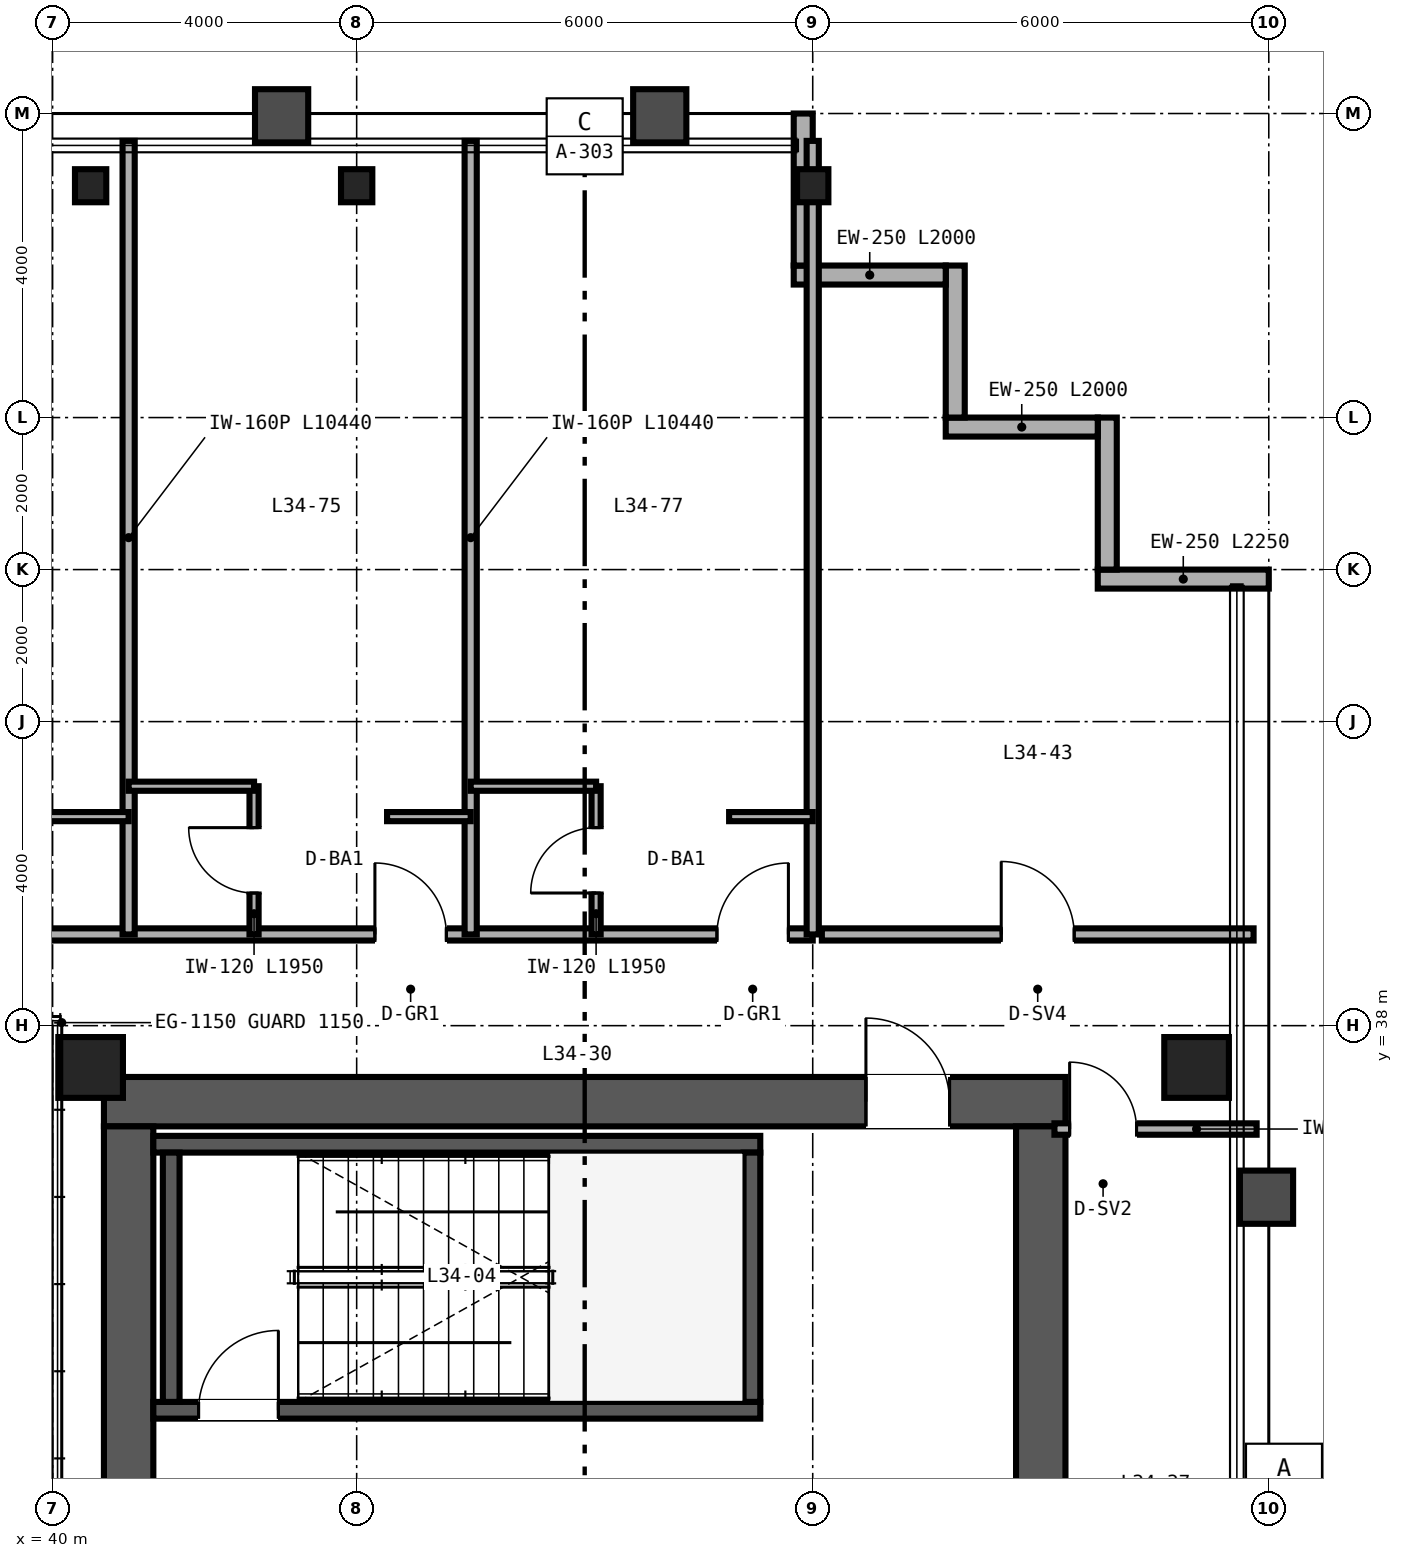
"""IFC4 building model, lengths in metres.
Left out: names, types, materials, properties, quantities, classifications, styles, units other than length and angle.
Written with IfcOpenShell. Run it as: python <this file> out.ifc"""

import sys

from ifc_helpers import new_model, si_unit, direction, frame, frame_2d, origin, origin_2d, place, context, subcontext, project, spatial, rectangle, hollow_rectangle, i_section, extrude, source, transform, mapped, element, fill, save


model = new_model("IFC4")
c1 = context("Model", 3, precision=1e-05, world=origin(), true_north=direction((0.0, 1.0)))
c2 = subcontext(c1, "Body", "Model", "MODEL_VIEW")
j1 = project(units=[si_unit("LENGTHUNIT", "METRE"), si_unit("PLANEANGLEUNIT", "RADIAN")], contexts=[c1])
p1 = place(None, origin())
s1 = spatial("IfcSite", under=j1, at=p1, CompositionType="ELEMENT")
p2 = place(p1, origin())
s2 = spatial("IfcBuilding", under=s1, at=p2, CompositionType="ELEMENT")
p3 = place(p2, frame((0.0, 0.0, 136.8)))
s3 = spatial("IfcBuildingStorey", under=s2, at=p3, CompositionType="ELEMENT", Elevation=136.8)
p4 = place(p3, frame((40.675, 37.0, 0.0), z_axis=(0.0, 0.0, 1.0), x_axis=(1.0, 0.0, 0.0)))
e1 = element("IfcWall", 1, at=p4, inside=s3, PredefinedType="SHEAR", context=c2, shape_type="SweptSolid", body=[
    extrude(rectangle(XDim=12.65, YDim=0.65, at=frame_2d((6.325, 0.0))), origin(), (0.0, 0.0, 1.0), 3.36),
])
p5 = place(p4, frame((10.025, 0.0, 0.0)))
e2 = element("IfcOpeningElement", 2, at=p5, cuts=e1, PredefinedType="OPENING", context=c2, shape_type="SweptSolid", body=[
    extrude(rectangle(XDim=1.1, YDim=2.15, at=frame_2d((0.55, 1.075))), frame((0.0, 0.335, 0.0), z_axis=(0.0, -1.0, 0.0), x_axis=(1.0, 0.0, 0.0)), (0.0, 0.0, 1.0), 0.67),
])
for number, where, z_axis, x_axis in (
    (3, (41.0, 15.325, 0.0), (0.0, 0.0, 1.0), (0.0, 1.0, 0.0)),
    (4, (53.0, 15.325, 0.0), (0.0, 0.0, 1.0), (0.0, 1.0, 0.0)),
):
    element("IfcWall", number, at=place(p3, frame(where, z_axis=z_axis, x_axis=x_axis)), inside=s3, PredefinedType="SHEAR", context=c2, shape_type="SweptSolid", body=[
        extrude(rectangle(XDim=21.35, YDim=0.65, at=frame_2d((10.675, 0.0))), origin(), (0.0, 0.0, 1.0), 3.36),
    ])
p6 = place(p3, frame((41.325, 32.94, 0.0), z_axis=(0.0, 0.0, 1.0), x_axis=(1.0, 0.0, 0.0)))
e5 = element("IfcWall", 5, at=p6, inside=s3, PredefinedType="SHEAR", context=c2, shape_type="SweptSolid", body=[
    extrude(rectangle(XDim=7.985, YDim=0.22, at=frame_2d((3.993, 0.0))), origin(), (0.0, 0.0, 1.0), 3.4),
])
p7 = place(p6, frame((0.595, 0.0, 0.0)))
e6 = element("IfcOpeningElement", 6, at=p7, cuts=e5, PredefinedType="OPENING", context=c2, shape_type="SweptSolid", body=[
    extrude(rectangle(XDim=1.05, YDim=2.15, at=frame_2d((0.525, 1.075))), frame((0.0, 0.12, 0.0), z_axis=(0.0, -1.0, 0.0), x_axis=(1.0, 0.0, 0.0)), (0.0, 0.0, 1.0), 0.24),
])
p8 = place(p3, frame((41.325, 36.44, 0.0), z_axis=(0.0, 0.0, 1.0), x_axis=(1.0, 0.0, 0.0)))
e7 = element("IfcWall", 7, at=p8, inside=s3, PredefinedType="SHEAR", context=c2, shape_type="SweptSolid", body=[
    extrude(rectangle(XDim=7.985, YDim=0.22, at=frame_2d((3.993, 0.0))), origin(), (0.0, 0.0, 1.0), 3.4),
])
for number, where, z_axis, x_axis in (
    (8, (41.56, 33.05, 0.0), (0.0, 0.0, 1.0), (0.0, 1.0, 0.0)),
    (9, (49.2, 33.05, 0.0), (0.0, 0.0, 1.0), (0.0, 1.0, 0.0)),
):
    element("IfcWall", number, at=place(p3, frame(where, z_axis=z_axis, x_axis=x_axis)), inside=s3, PredefinedType="SHEAR", context=c2, shape_type="SweptSolid", body=[
        extrude(rectangle(XDim=3.28, YDim=0.22, at=frame_2d((1.64, 0.0))), origin(), (0.0, 0.0, 1.0), 3.4),
    ])
m1 = source(origin(), c2, "Body", "SweptSolid", [
    extrude(hollow_rectangle(XDim=0.85, YDim=0.8, WallThickness=0.032, at=origin_2d()), origin(), (0.0, 0.0, 1.0), 3.36),
])
for number, where, z_axis, x_axis in (
    (10, (40.5, 37.45, 0.0), (0.0, 0.0, 1.0), (1.0, 0.0, 0.0)),
    (11, (55.05, 37.45, 0.0), (0.0, 0.0, 1.0), (1.0, 0.0, 0.0)),
):
    element("IfcColumn", number, at=place(p3, frame(where, z_axis=z_axis, x_axis=x_axis)), inside=s3, PredefinedType="COLUMN", context=c2, shape_type="MappedRepresentation", body=[
        mapped(m1, transform((0.0, 0.0, 0.0), scale=1.0)),
    ])
m2 = source(origin(), c2, "Body", "SweptSolid", [
    extrude(i_section(OverallWidth=0.412, OverallDepth=0.435, WebThickness=0.036, FlangeThickness=0.057, FilletRadius=0.025, at=origin_2d()), origin(), (0.0, 0.0, 1.0), 3.36),
])
for number, where, z_axis, x_axis in (
    (12, (40.5, 49.05, 0.0), (0.0, 0.0, 1.0), (1.0, 0.0, 0.0)),
    (13, (44.0, 49.05, 0.0), (0.0, 0.0, 1.0), (1.0, 0.0, 0.0)),
    (14, (50.0, 49.05, 0.0), (0.0, 0.0, 1.0), (1.0, 0.0, 0.0)),
):
    element("IfcColumn", number, at=place(p3, frame(where, z_axis=z_axis, x_axis=x_axis)), inside=s3, PredefinedType="COLUMN", context=c2, shape_type="MappedRepresentation", body=[
        mapped(m2, transform((0.0, 0.0, 0.0), scale=1.0)),
    ])
p9 = place(p3, frame((56.0, 43.875, 0.0), z_axis=(0.0, 0.0, 1.0), x_axis=(-1.0, 0.0, 0.0)))
e15 = element("IfcWall", 15, at=p9, inside=s3, PredefinedType="SOLIDWALL", context=c2, shape_type="SweptSolid", body=[
    extrude(rectangle(XDim=2.25, YDim=0.25, at=frame_2d((1.125, 0.0))), origin(), (0.0, 0.0, 1.0), 3.36),
])
for number, where, z_axis, x_axis in (
    (16, (53.875, 44.0, 0.0), (0.0, 0.0, 1.0), (0.0, 1.0, 0.0)),
    (17, (53.75, 45.875, 0.0), (0.0, 0.0, 1.0), (-1.0, 0.0, 0.0)),
    (18, (51.875, 46.0, 0.0), (0.0, 0.0, 1.0), (0.0, 1.0, 0.0)),
    (19, (51.75, 47.875, 0.0), (0.0, 0.0, 1.0), (-1.0, 0.0, 0.0)),
):
    element("IfcWall", number, at=place(p3, frame(where, z_axis=z_axis, x_axis=x_axis)), inside=s3, PredefinedType="SOLIDWALL", context=c2, shape_type="SweptSolid", body=[
        extrude(rectangle(XDim=2.0, YDim=0.25, at=frame_2d((1.0, 0.0))), origin(), (0.0, 0.0, 1.0), 3.36),
    ])
p10 = place(p3, frame((49.875, 48.0, 0.0), z_axis=(0.0, 0.0, 1.0), x_axis=(0.0, 1.0, 0.0)))
e20 = element("IfcWall", 20, at=p10, inside=s3, PredefinedType="SOLIDWALL", context=c2, shape_type="SweptSolid", body=[
    extrude(rectangle(XDim=2.0, YDim=0.25, at=frame_2d((1.0, 0.0))), origin(), (0.0, 0.0, 1.0), 2.667),
])
p11 = place(p3, frame((53.18, 36.64, 0.0), z_axis=(0.0, 0.0, 1.0), x_axis=(1.0, 0.0, 0.0)))
e21 = element("IfcWall", 21, at=p11, inside=s3, PredefinedType="PARTITIONING", context=c2, shape_type="SweptSolid", body=[
    extrude(rectangle(XDim=2.66, YDim=0.15, at=frame_2d((1.33, 0.0))), origin(), (0.0, 0.0, 1.0), 2.743),
])
p12 = place(p11, frame((0.2, 0.0, 0.0)))
e22 = element("IfcOpeningElement", 22, at=p12, cuts=e21, PredefinedType="OPENING", context=c2, shape_type="SweptSolid", body=[
    extrude(rectangle(XDim=0.88, YDim=2.15, at=frame_2d((0.44, 1.075))), frame((0.0, 0.085, 0.0), z_axis=(0.0, -1.0, 0.0), x_axis=(1.0, 0.0, 0.0)), (0.0, 0.0, 1.0), 0.17),
])
p13 = place(p3, frame((50.12, 39.2, 0.0), z_axis=(0.0, 0.0, 1.0), x_axis=(1.0, 0.0, 0.0)))
e23 = element("IfcWall", 23, at=p13, inside=s3, PredefinedType="PARTITIONING", context=c2, shape_type="SweptSolid", body=[
    extrude(rectangle(XDim=5.68, YDim=0.16, at=frame_2d((2.84, 0.0))), origin(), (0.0, 0.0, 1.0), 3.36),
])
p14 = place(p13, frame((2.36, 0.0, 0.0)))
e24 = element("IfcOpeningElement", 24, at=p14, cuts=e23, PredefinedType="OPENING", context=c2, shape_type="SweptSolid", body=[
    extrude(rectangle(XDim=0.96, YDim=2.15, at=frame_2d((0.48, 1.075))), frame((0.0, 0.09, 0.0), z_axis=(0.0, -1.0, 0.0), x_axis=(1.0, 0.0, 0.0)), (0.0, 0.0, 1.0), 0.18),
])
p15 = place(p3, frame((14.0, 39.2, 0.0), z_axis=(0.0, 0.0, 1.0), x_axis=(1.0, 0.0, 0.0)))
e25 = element("IfcWall", 25, at=p15, inside=s3, PredefinedType="PARTITIONING", context=c2, shape_type="SweptSolid", body=[
    extrude(rectangle(XDim=36.0, YDim=0.16, at=frame_2d((18.0, 0.0))), origin(), (0.0, 0.0, 1.0), 2.581),
])
p16 = place(p15, frame((3.14, 0.0, 0.0)))
e26 = element("IfcOpeningElement", 26, at=p16, cuts=e25, PredefinedType="OPENING", context=c2, shape_type="SweptSolid", body=[
    extrude(rectangle(XDim=0.94, YDim=2.15, at=frame_2d((0.47, 1.075))), frame((0.0, 0.09, 0.0), z_axis=(0.0, -1.0, 0.0), x_axis=(1.0, 0.0, 0.0)), (0.0, 0.0, 1.0), 0.18),
])
p17 = place(p15, frame((7.54, 0.0, 0.0)))
e27 = element("IfcOpeningElement", 27, at=p17, cuts=e25, PredefinedType="OPENING", context=c2, shape_type="SweptSolid", body=[
    extrude(rectangle(XDim=0.94, YDim=2.15, at=frame_2d((0.47, 1.075))), frame((0.0, 0.09, 0.0), z_axis=(0.0, -1.0, 0.0), x_axis=(1.0, 0.0, 0.0)), (0.0, 0.0, 1.0), 0.18),
])
p18 = place(p15, frame((11.94, 0.0, 0.0)))
e28 = element("IfcOpeningElement", 28, at=p18, cuts=e25, PredefinedType="OPENING", context=c2, shape_type="SweptSolid", body=[
    extrude(rectangle(XDim=0.94, YDim=2.15, at=frame_2d((0.47, 1.075))), frame((0.0, 0.09, 0.0), z_axis=(0.0, -1.0, 0.0), x_axis=(1.0, 0.0, 0.0)), (0.0, 0.0, 1.0), 0.18),
])
p19 = place(p15, frame((15.02, 0.0, 0.0)))
e29 = element("IfcOpeningElement", 29, at=p19, cuts=e25, PredefinedType="OPENING", context=c2, shape_type="SweptSolid", body=[
    extrude(rectangle(XDim=0.96, YDim=2.15, at=frame_2d((0.48, 1.075))), frame((0.0, 0.09, 0.0), z_axis=(0.0, -1.0, 0.0), x_axis=(1.0, 0.0, 0.0)), (0.0, 0.0, 1.0), 0.18),
])
p20 = place(p15, frame((21.14, 0.0, 0.0)))
e30 = element("IfcOpeningElement", 30, at=p20, cuts=e25, PredefinedType="OPENING", context=c2, shape_type="SweptSolid", body=[
    extrude(rectangle(XDim=0.94, YDim=2.15, at=frame_2d((0.47, 1.075))), frame((0.0, 0.09, 0.0), z_axis=(0.0, -1.0, 0.0), x_axis=(1.0, 0.0, 0.0)), (0.0, 0.0, 1.0), 0.18),
])
p21 = place(p15, frame((24.79, 0.0, 0.0)))
e31 = element("IfcOpeningElement", 31, at=p21, cuts=e25, PredefinedType="OPENING", context=c2, shape_type="SweptSolid", body=[
    extrude(rectangle(XDim=0.94, YDim=2.15, at=frame_2d((0.47, 1.075))), frame((0.0, 0.09, 0.0), z_axis=(0.0, -1.0, 0.0), x_axis=(1.0, 0.0, 0.0)), (0.0, 0.0, 1.0), 0.18),
])
p22 = place(p15, frame((30.24, 0.0, 0.0)))
e32 = element("IfcOpeningElement", 32, at=p22, cuts=e25, PredefinedType="OPENING", context=c2, shape_type="SweptSolid", body=[
    extrude(rectangle(XDim=0.94, YDim=2.15, at=frame_2d((0.47, 1.075))), frame((0.0, 0.09, 0.0), z_axis=(0.0, -1.0, 0.0), x_axis=(1.0, 0.0, 0.0)), (0.0, 0.0, 1.0), 0.18),
])
p23 = place(p15, frame((34.74, 0.0, 0.0)))
e33 = element("IfcOpeningElement", 33, at=p23, cuts=e25, PredefinedType="OPENING", context=c2, shape_type="SweptSolid", body=[
    extrude(rectangle(XDim=0.94, YDim=2.15, at=frame_2d((0.47, 1.075))), frame((0.0, 0.09, 0.0), z_axis=(0.0, -1.0, 0.0), x_axis=(1.0, 0.0, 0.0)), (0.0, 0.0, 1.0), 0.18),
])
p24 = place(p3, frame((50.0, 39.2, 0.0), z_axis=(0.0, 0.0, 1.0), x_axis=(0.0, 1.0, 0.0)))
e34 = element("IfcWall", 34, at=p24, inside=s3, PredefinedType="PARTITIONING", context=c2, shape_type="SweptSolid", body=[
    extrude(rectangle(XDim=10.44, YDim=0.16, at=frame_2d((5.22, 0.0))), origin(), (0.0, 0.0, 1.0), 2.667),
])
p25 = place(p3, frame((41.0, 39.2, 0.0), z_axis=(0.0, 0.0, 1.0), x_axis=(0.0, 1.0, 0.0)))
e35 = element("IfcWall", 35, at=p25, inside=s3, PredefinedType="PARTITIONING", context=c2, shape_type="SweptSolid", body=[
    extrude(rectangle(XDim=10.44, YDim=0.16, at=frame_2d((5.22, 0.0))), origin(), (0.0, 0.0, 1.0), 2.823),
])
p26 = place(p3, frame((39.9, 40.75, 0.0), z_axis=(0.0, 0.0, 1.0), x_axis=(1.0, 0.0, 0.0)))
e36 = element("IfcWall", 36, at=p26, inside=s3, PredefinedType="PARTITIONING", context=c2, shape_type="SweptSolid", body=[
    extrude(rectangle(XDim=1.1, YDim=0.12, at=frame_2d((0.55, 0.0))), origin(), (0.0, 0.0, 1.0), 2.581),
])
p27 = place(p3, frame((45.5, 39.2, 0.0), z_axis=(0.0, 0.0, 1.0), x_axis=(0.0, 1.0, 0.0)))
e37 = element("IfcWall", 37, at=p27, inside=s3, PredefinedType="PARTITIONING", context=c2, shape_type="SweptSolid", body=[
    extrude(rectangle(XDim=10.44, YDim=0.16, at=frame_2d((5.22, 0.0))), origin(), (0.0, 0.0, 1.0), 2.667),
])
p28 = place(p3, frame((42.65, 39.2, 0.0), z_axis=(0.0, 0.0, 1.0), x_axis=(0.0, 1.0, 0.0)))
e38 = element("IfcWall", 38, at=p28, inside=s3, PredefinedType="PARTITIONING", context=c2, shape_type="SweptSolid", body=[
    extrude(rectangle(XDim=1.95, YDim=0.12, at=frame_2d((0.975, 0.0))), origin(), (0.0, 0.0, 1.0), 3.36),
])
p29 = place(p28, frame((0.545, 0.0, 0.0)))
e39 = element("IfcOpeningElement", 39, at=p29, cuts=e38, PredefinedType="OPENING", context=c2, shape_type="SweptSolid", body=[
    extrude(rectangle(XDim=0.86, YDim=2.1, at=frame_2d((0.43, 1.05))), frame((0.0, 0.07, 0.0), z_axis=(0.0, -1.0, 0.0), x_axis=(1.0, 0.0, 0.0)), (0.0, 0.0, 1.0), 0.14),
])
p30 = place(p3, frame((41.0, 41.15, 0.0), z_axis=(0.0, 0.0, 1.0), x_axis=(1.0, 0.0, 0.0)))
e40 = element("IfcWall", 40, at=p30, inside=s3, PredefinedType="PARTITIONING", context=c2, shape_type="SweptSolid", body=[
    extrude(rectangle(XDim=1.65, YDim=0.12, at=frame_2d((0.825, 0.0))), origin(), (0.0, 0.0, 1.0), 3.36),
])
p31 = place(p3, frame((44.4, 40.75, 0.0), z_axis=(0.0, 0.0, 1.0), x_axis=(1.0, 0.0, 0.0)))
e41 = element("IfcWall", 41, at=p31, inside=s3, PredefinedType="PARTITIONING", context=c2, shape_type="SweptSolid", body=[
    extrude(rectangle(XDim=1.1, YDim=0.12, at=frame_2d((0.55, 0.0))), origin(), (0.0, 0.0, 1.0), 3.36),
])
p32 = place(p3, frame((47.15, 39.2, 0.0), z_axis=(0.0, 0.0, 1.0), x_axis=(0.0, 1.0, 0.0)))
e42 = element("IfcWall", 42, at=p32, inside=s3, PredefinedType="PARTITIONING", context=c2, shape_type="SweptSolid", body=[
    extrude(rectangle(XDim=1.95, YDim=0.12, at=frame_2d((0.975, 0.0))), origin(), (0.0, 0.0, 1.0), 3.36),
])
p33 = place(p32, frame((0.545, 0.0, 0.0)))
e43 = element("IfcOpeningElement", 43, at=p33, cuts=e42, PredefinedType="OPENING", context=c2, shape_type="SweptSolid", body=[
    extrude(rectangle(XDim=0.86, YDim=2.1, at=frame_2d((0.43, 1.05))), frame((0.0, 0.07, 0.0), z_axis=(0.0, -1.0, 0.0), x_axis=(1.0, 0.0, 0.0)), (0.0, 0.0, 1.0), 0.14),
])
p34 = place(p3, frame((45.5, 41.15, 0.0), z_axis=(0.0, 0.0, 1.0), x_axis=(1.0, 0.0, 0.0)))
e44 = element("IfcWall", 44, at=p34, inside=s3, PredefinedType="PARTITIONING", context=c2, shape_type="SweptSolid", body=[
    extrude(rectangle(XDim=1.65, YDim=0.12, at=frame_2d((0.825, 0.0))), origin(), (0.0, 0.0, 1.0), 3.36),
])
p35 = place(p3, frame((48.9, 40.75, 0.0), z_axis=(0.0, 0.0, 1.0), x_axis=(1.0, 0.0, 0.0)))
e45 = element("IfcWall", 45, at=p35, inside=s3, PredefinedType="PARTITIONING", context=c2, shape_type="SweptSolid", body=[
    extrude(rectangle(XDim=1.1, YDim=0.12, at=frame_2d((0.55, 0.0))), origin(), (0.0, 0.0, 1.0), 3.36),
])
m3 = source(origin(), c2, "Body", "SweptSolid", [
    extrude(rectangle(XDim=1.05, YDim=2.15, at=frame_2d((0.525, 1.075))), frame((0.0, 0.025, 0.0), z_axis=(0.0, -1.0, 0.0), x_axis=(1.0, 0.0, 0.0)), (0.0, 0.0, 1.0), 0.05),
])
p36 = place(p7, origin())
e46 = element("IfcDoor", 46, at=p36, inside=s3, OperationType="SINGLE_SWING_RIGHT", PredefinedType="DOOR", context=c2, shape_type="MappedRepresentation", body=[
    mapped(m3, transform((0.0, 0.0, 0.0), scale=1.0)),
])
fill(e6, e46)
m4 = source(origin(), c2, "Body", "SweptSolid", [
    extrude(rectangle(XDim=1.1, YDim=2.15, at=frame_2d((0.55, 1.075))), frame((0.0, 0.025, 0.0), z_axis=(0.0, -1.0, 0.0), x_axis=(1.0, 0.0, 0.0)), (0.0, 0.0, 1.0), 0.05),
])
p37 = place(p5, origin())
e47 = element("IfcDoor", 47, at=p37, inside=s3, OperationType="SINGLE_SWING_LEFT", PredefinedType="DOOR", context=c2, shape_type="MappedRepresentation", body=[
    mapped(m4, transform((0.0, 0.0, 0.0), scale=1.0)),
])
fill(e2, e47)
m5 = source(origin(), c2, "Body", "SweptSolid", [
    extrude(rectangle(XDim=0.88, YDim=2.15, at=frame_2d((0.44, 1.075))), frame((0.0, 0.025, 0.0), z_axis=(0.0, -1.0, 0.0), x_axis=(1.0, 0.0, 0.0)), (0.0, 0.0, 1.0), 0.05),
])
p38 = place(p12, origin())
e48 = element("IfcDoor", 48, at=p38, inside=s3, OperationType="SINGLE_SWING_LEFT", PredefinedType="DOOR", context=c2, shape_type="MappedRepresentation", body=[
    mapped(m5, transform((0.0, 0.0, 0.0), scale=1.0)),
])
fill(e22, e48)
m6 = source(origin(), c2, "Body", "SweptSolid", [
    extrude(rectangle(XDim=0.96, YDim=2.15, at=frame_2d((0.48, 1.075))), frame((0.0, 0.025, 0.0), z_axis=(0.0, -1.0, 0.0), x_axis=(1.0, 0.0, 0.0)), (0.0, 0.0, 1.0), 0.05),
])
p39 = place(p14, origin())
e49 = element("IfcDoor", 49, at=p39, inside=s3, OperationType="SINGLE_SWING_LEFT", PredefinedType="DOOR", context=c2, shape_type="MappedRepresentation", body=[
    mapped(m6, transform((0.0, 0.0, 0.0), scale=1.0)),
])
fill(e24, e49)
m7 = source(origin(), c2, "Body", "SweptSolid", [
    extrude(rectangle(XDim=0.86, YDim=2.1, at=frame_2d((0.43, 1.05))), frame((0.0, 0.025, 0.0), z_axis=(0.0, -1.0, 0.0), x_axis=(1.0, 0.0, 0.0)), (0.0, 0.0, 1.0), 0.05),
])
p40 = place(p29, origin())
e50 = element("IfcDoor", 50, at=p40, inside=s3, OperationType="SINGLE_SWING_RIGHT", PredefinedType="DOOR", context=c2, shape_type="MappedRepresentation", body=[
    mapped(m7, transform((0.0, 0.0, 0.0), scale=1.0)),
])
fill(e39, e50)
p41 = place(p33, origin())
e51 = element("IfcDoor", 51, at=p41, inside=s3, OperationType="SINGLE_SWING_LEFT", PredefinedType="DOOR", context=c2, shape_type="MappedRepresentation", body=[
    mapped(m7, transform((0.0, 0.0, 0.0), scale=1.0)),
])
fill(e43, e51)
m8 = source(origin(), c2, "Body", "SweptSolid", [
    extrude(rectangle(XDim=0.94, YDim=2.15, at=frame_2d((0.47, 1.075))), frame((0.0, 0.025, 0.0), z_axis=(0.0, -1.0, 0.0), x_axis=(1.0, 0.0, 0.0)), (0.0, 0.0, 1.0), 0.05),
])
p42 = place(p22, origin())
e52 = element("IfcDoor", 52, at=p42, inside=s3, OperationType="SINGLE_SWING_LEFT", PredefinedType="DOOR", context=c2, shape_type="MappedRepresentation", body=[
    mapped(m8, transform((0.0, 0.0, 0.0), scale=1.0)),
])
fill(e32, e52)
p43 = place(p23, origin())
e53 = element("IfcDoor", 53, at=p43, inside=s3, OperationType="SINGLE_SWING_RIGHT", PredefinedType="DOOR", context=c2, shape_type="MappedRepresentation", body=[
    mapped(m8, transform((0.0, 0.0, 0.0), scale=1.0)),
])
fill(e33, e53)
save(model, sys.argv[1])
